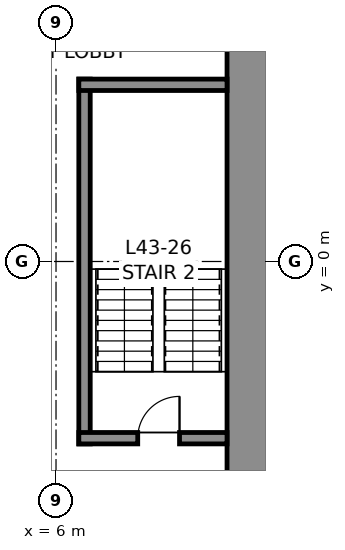
"""IFC4 building model, lengths in metres.
Left out: names, types, materials, properties, quantities, classifications, styles, units other than length and angle.
Written with IfcOpenShell. Run it as: python <this file> out.ifc"""

import sys

from ifc_helpers import new_model, si_unit, direction, frame, frame_2d, origin, place, context, subcontext, project, spatial, rectangle, extrude, element, fill, save


model = new_model("IFC4")
c1 = context("Model", 3, precision=1e-05, world=origin(), true_north=direction((0.0, 1.0)))
c2 = subcontext(c1, "Body", "Model", "MODEL_VIEW")
j1 = project(units=[si_unit("LENGTHUNIT", "METRE"), si_unit("PLANEANGLEUNIT", "RADIAN")], contexts=[c1])
p1 = place(None, origin())
s1 = spatial("IfcSite", under=j1, at=p1, CompositionType="ELEMENT")
p2 = place(p1, origin())
s2 = spatial("IfcBuilding", under=s1, at=p2, CompositionType="ELEMENT")
p3 = place(p2, frame((0.0, 0.0, 201.8)))
s3 = spatial("IfcBuildingStorey", under=s2, at=p3, CompositionType="ELEMENT", Elevation=201.8)
p4 = place(p3, frame((11.25, 10.5, 0.0), z_axis=(0.0, 0.0, 1.0), x_axis=(0.0, -1.0, 0.0)))
e1 = element("IfcWall", 1, at=p4, inside=s3, PredefinedType="SHEAR", context=c2, shape_type="SweptSolid", body=[
    extrude(rectangle(XDim=21.0, YDim=1.5, at=frame_2d((10.5, 0.0))), origin(), (0.0, 0.0, 1.0), 4.0),
])
p5 = place(p4, frame((3.7, 0.0, 0.0)))
e2 = element("IfcOpeningElement", 2, at=p5, cuts=e1, PredefinedType="OPENING", context=c2, shape_type="SweptSolid", body=[
    extrude(rectangle(XDim=1.2, YDim=2.3, at=frame_2d((0.6, 1.15))), frame((0.0, 0.76, 0.0), z_axis=(0.0, -1.0, 0.0), x_axis=(1.0, 0.0, 0.0)), (0.0, 0.0, 1.0), 1.52),
])
p6 = place(p4, frame((16.1, 0.0, 0.0)))
e3 = element("IfcOpeningElement", 3, at=p6, cuts=e1, PredefinedType="OPENING", context=c2, shape_type="SweptSolid", body=[
    extrude(rectangle(XDim=1.2, YDim=2.3, at=frame_2d((0.6, 1.15))), frame((0.0, 0.76, 0.0), z_axis=(0.0, -1.0, 0.0), x_axis=(1.0, 0.0, 0.0)), (0.0, 0.0, 1.0), 1.52),
])
p7 = place(p3, frame((6.75, -4.8, 0.0), z_axis=(0.0, 0.0, 1.0), x_axis=(0.0, 1.0, 0.0)))
e4 = element("IfcWall", 4, at=p7, inside=s3, PredefinedType="SOLIDWALL", context=c2, shape_type="SweptSolid", body=[
    extrude(rectangle(XDim=9.6, YDim=0.3, at=frame_2d((4.8, 0.0))), origin(), (0.0, 0.0, 1.0), 3.75),
])
p8 = place(p3, frame((6.6, 4.65, 0.0), z_axis=(0.0, 0.0, 1.0), x_axis=(1.0, 0.0, 0.0)))
e5 = element("IfcWall", 5, at=p8, inside=s3, PredefinedType="SOLIDWALL", context=c2, shape_type="SweptSolid", body=[
    extrude(rectangle(XDim=3.9, YDim=0.3, at=frame_2d((1.95, 0.0))), origin(), (0.0, 0.0, 1.0), 3.75),
])
p9 = place(p3, frame((10.5, -4.65, 0.0), z_axis=(0.0, 0.0, 1.0), x_axis=(-1.0, 0.0, 0.0)))
e6 = element("IfcWall", 6, at=p9, inside=s3, PredefinedType="SOLIDWALL", context=c2, shape_type="SweptSolid", body=[
    extrude(rectangle(XDim=3.9, YDim=0.3, at=frame_2d((1.95, 0.0))), origin(), (0.0, 0.0, 1.0), 3.75),
])
p10 = place(p9, frame((1.25, 0.0, 0.0)))
e7 = element("IfcOpeningElement", 7, at=p10, cuts=e6, PredefinedType="OPENING", context=c2, shape_type="SweptSolid", body=[
    extrude(rectangle(XDim=1.1, YDim=2.3, at=frame_2d((0.55, 1.15))), frame((0.0, 0.16, 0.0), z_axis=(0.0, -1.0, 0.0), x_axis=(1.0, 0.0, 0.0)), (0.0, 0.0, 1.0), 0.32),
])
p11 = place(p10, frame((1.1, 0.0, 0.0), z_axis=(0.0, 0.0, 1.0), x_axis=(-1.0, 0.0, 0.0)))
e8 = element("IfcDoor", 8, at=p11, inside=s3, OperationType="SINGLE_SWING_RIGHT", PredefinedType="DOOR", context=c2, shape_type="SweptSolid", body=[
    extrude(rectangle(XDim=1.1, YDim=2.3, at=frame_2d((0.55, 1.15))), frame((0.0, 0.025, 0.0), z_axis=(0.0, -1.0, 0.0), x_axis=(1.0, 0.0, 0.0)), (0.0, 0.0, 1.0), 0.05),
])
fill(e7, e8)
save(model, sys.argv[1])
